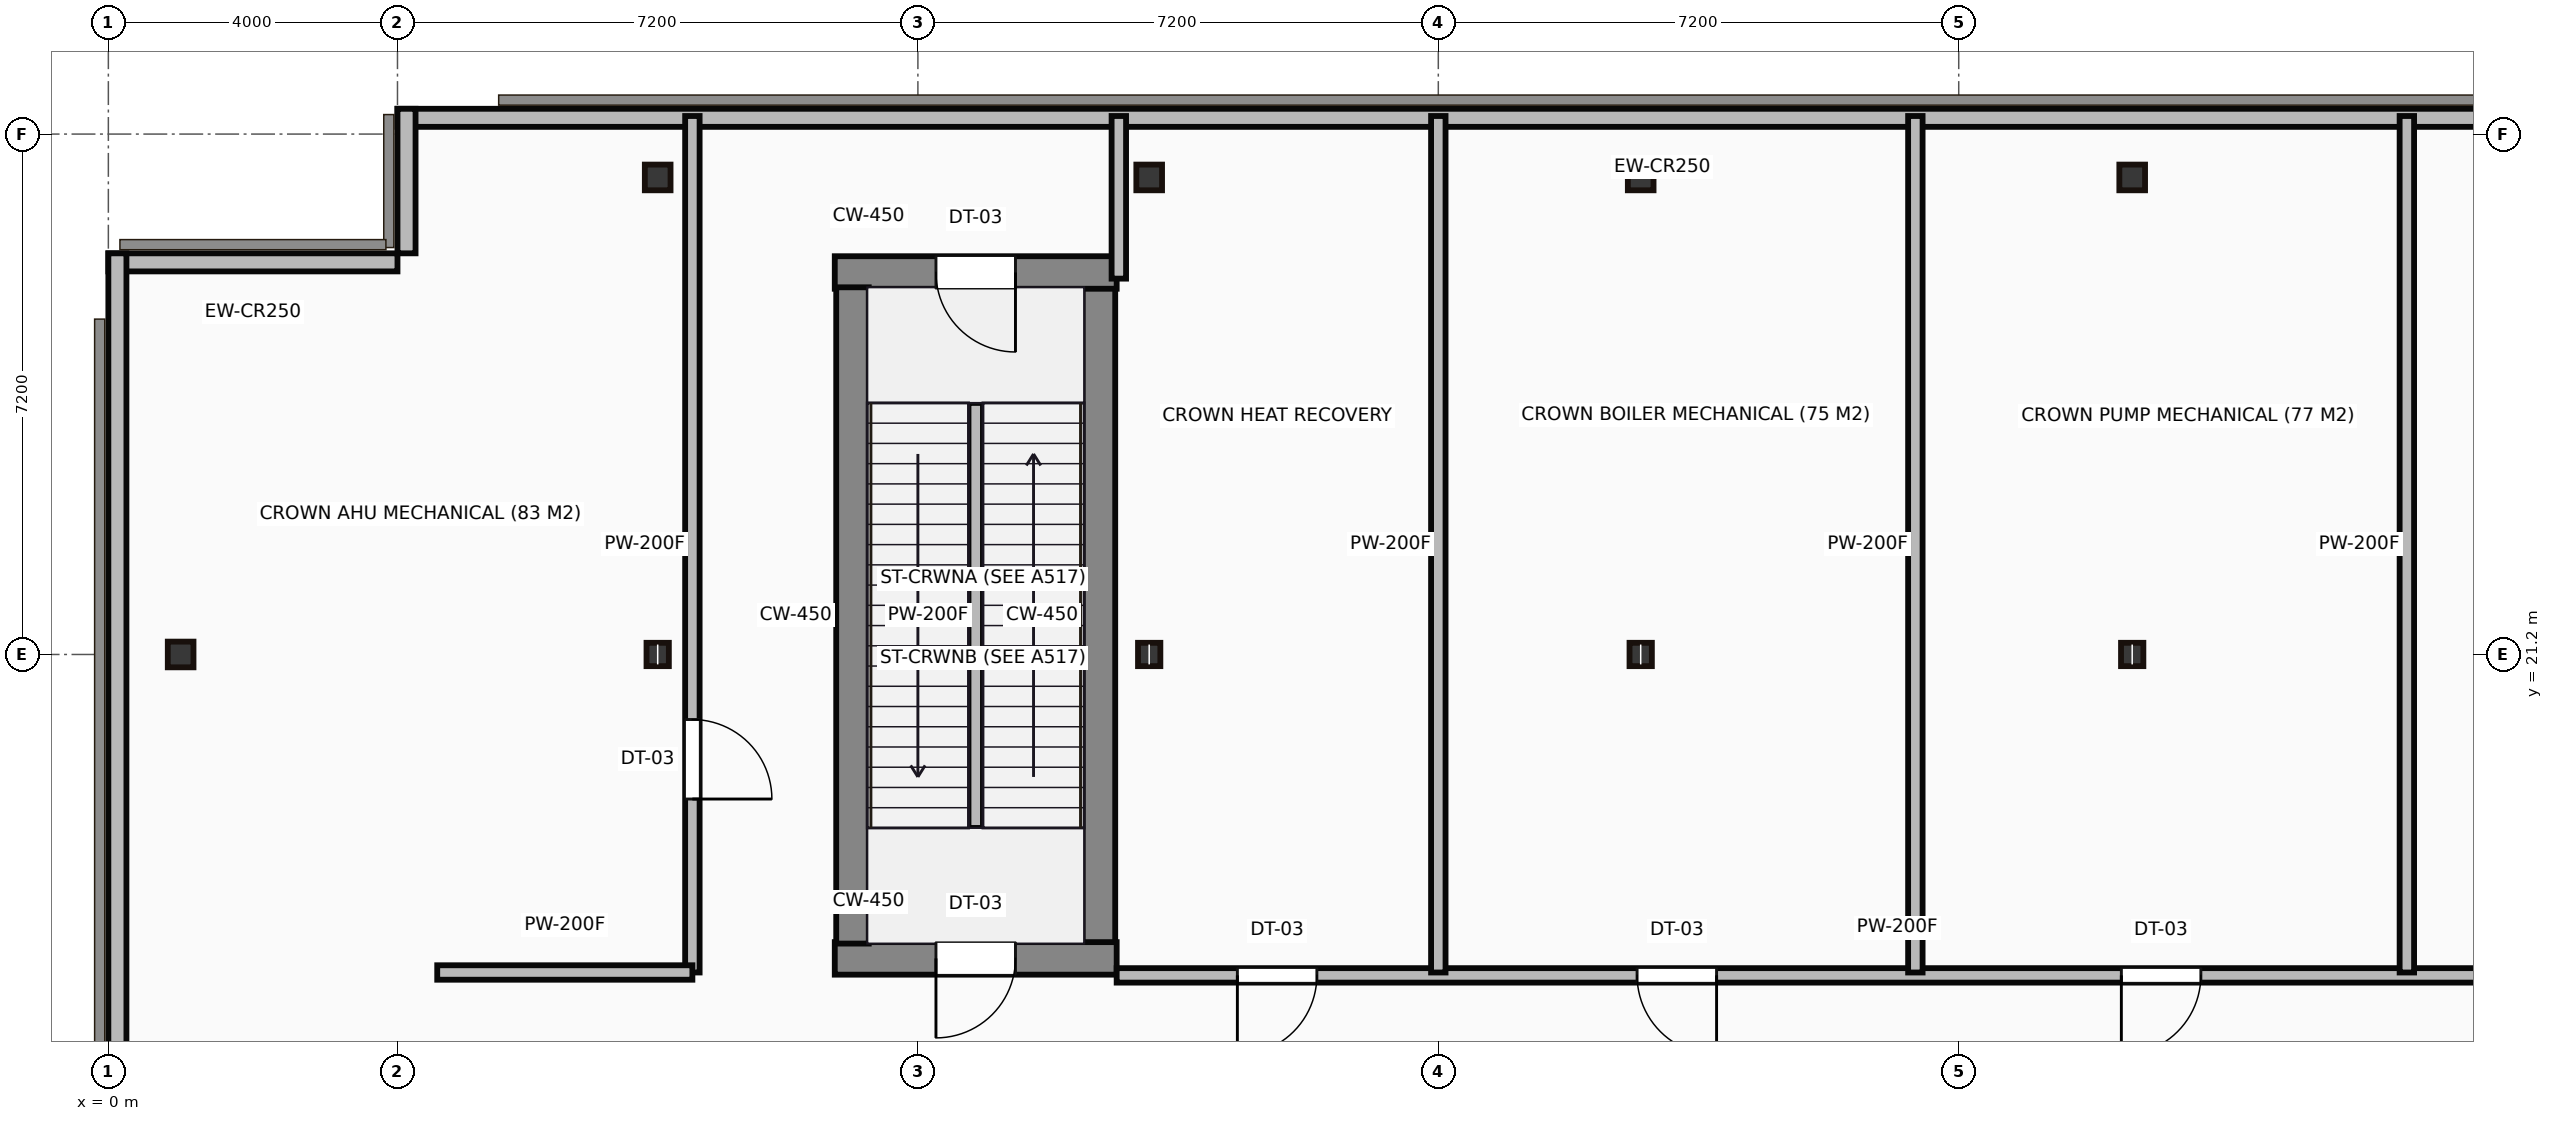
"""IFC4 building model, lengths in metres.
Left out: names, types, materials, properties, quantities, classifications, styles, units other than length and angle.
Written with IfcOpenShell. Run it as: python <this file> out.ifc"""

import sys

from ifc_helpers import new_model, si_unit, direction, frame, frame_2d, origin, origin_2d, place, context, subcontext, project, spatial, rectangle, hollow_rectangle, i_section, extrude, source, transform, mapped, element, fill, save


model = new_model("IFC4")
c1 = context("Model", 3, precision=1e-05, world=origin(), true_north=direction((0.0, 1.0)))
c2 = subcontext(c1, "Body", "Model", "MODEL_VIEW")
j1 = project(units=[si_unit("LENGTHUNIT", "METRE"), si_unit("PLANEANGLEUNIT", "RADIAN")], contexts=[c1])
p1 = place(None, origin())
s1 = spatial("IfcSite", under=j1, at=p1, CompositionType="ELEMENT")
p2 = place(p1, origin())
s2 = spatial("IfcBuilding", under=s1, at=p2, CompositionType="ELEMENT")
p3 = place(p2, frame((0.0, 0.0, 307.45)))
s3 = spatial("IfcBuildingStorey", under=s2, at=p3, CompositionType="ELEMENT", Elevation=307.45)
m1 = source(origin(), c2, "Body", "SweptSolid", [
    extrude(hollow_rectangle(XDim=0.356, YDim=0.356, WallThickness=0.019, at=origin_2d()), origin(), (0.0, 0.0, 1.0), 3.8),
])
p4 = place(p3, frame((1.0, 21.2, 0.0), z_axis=(0.0, 0.0, 1.0), x_axis=(1.0, 0.0, 0.0)))
e1 = element("IfcColumn", 1, at=p4, inside=s3, PredefinedType="COLUMN", context=c2, shape_type="MappedRepresentation", body=[
    mapped(m1, transform((0.0, 0.0, 0.0))),
])
m2 = source(origin(), c2, "Body", "SweptSolid", [
    extrude(i_section(OverallWidth=0.309, OverallDepth=0.323, WebThickness=0.014, FlangeThickness=0.023, at=origin_2d()), origin(), (0.0, 0.0, 1.0), 3.8),
])
p5 = place(p3, frame((7.6, 21.2, 0.0), z_axis=(0.0, 0.0, 1.0), x_axis=(1.0, 0.0, 0.0)))
e2 = element("IfcColumn", 2, at=p5, inside=s3, PredefinedType="COLUMN", context=c2, shape_type="MappedRepresentation", body=[
    mapped(m2, transform((0.0, 0.0, 0.0))),
])
p6 = place(p3, frame((7.6, 27.8, 0.0), z_axis=(0.0, 0.0, 1.0), x_axis=(1.0, 0.0, 0.0)))
e3 = element("IfcColumn", 3, at=p6, inside=s3, PredefinedType="COLUMN", context=c2, shape_type="MappedRepresentation", body=[
    mapped(m1, transform((0.0, 0.0, 0.0))),
])
p7 = place(p3, frame((14.4, 21.2, 0.0), z_axis=(0.0, 0.0, 1.0), x_axis=(1.0, 0.0, 0.0)))
e4 = element("IfcColumn", 4, at=p7, inside=s3, PredefinedType="COLUMN", context=c2, shape_type="MappedRepresentation", body=[
    mapped(m2, transform((0.0, 0.0, 0.0))),
])
p8 = place(p3, frame((14.4, 27.8, 0.0), z_axis=(0.0, 0.0, 1.0), x_axis=(1.0, 0.0, 0.0)))
e5 = element("IfcColumn", 5, at=p8, inside=s3, PredefinedType="COLUMN", context=c2, shape_type="MappedRepresentation", body=[
    mapped(m1, transform((0.0, 0.0, 0.0))),
])
p9 = place(p3, frame((21.2, 21.2, 0.0), z_axis=(0.0, 0.0, 1.0), x_axis=(1.0, 0.0, 0.0)))
e6 = element("IfcColumn", 6, at=p9, inside=s3, PredefinedType="COLUMN", context=c2, shape_type="MappedRepresentation", body=[
    mapped(m2, transform((0.0, 0.0, 0.0))),
])
p10 = place(p3, frame((21.2, 27.8, 0.0), z_axis=(0.0, 0.0, 1.0), x_axis=(1.0, 0.0, 0.0)))
e7 = element("IfcColumn", 7, at=p10, inside=s3, PredefinedType="COLUMN", context=c2, shape_type="MappedRepresentation", body=[
    mapped(m1, transform((0.0, 0.0, 0.0))),
])
p11 = place(p3, frame((28.0, 21.2, 0.0), z_axis=(0.0, 0.0, 1.0), x_axis=(1.0, 0.0, 0.0)))
e8 = element("IfcColumn", 8, at=p11, inside=s3, PredefinedType="COLUMN", context=c2, shape_type="MappedRepresentation", body=[
    mapped(m2, transform((0.0, 0.0, 0.0))),
])
p12 = place(p3, frame((28.0, 27.8, 0.0), z_axis=(0.0, 0.0, 1.0), x_axis=(1.0, 0.0, 0.0)))
e9 = element("IfcColumn", 9, at=p12, inside=s3, PredefinedType="COLUMN", context=c2, shape_type="MappedRepresentation", body=[
    mapped(m1, transform((0.0, 0.0, 0.0))),
])
m3 = source(origin(), c2, "Body", "SweptSolid", [
    extrude(rectangle(XDim=35.0, YDim=0.25, at=frame_2d((17.5, 0.0))), origin(), (0.0, 0.0, 1.0), 3.5),
])
p13 = place(p3, frame((39.0, 28.625, 0.0), z_axis=(0.0, 0.0, 1.0), x_axis=(-1.0, 0.0, 0.0)))
e10 = element("IfcWall", 10, at=p13, inside=s3, PredefinedType="STANDARD", context=c2, shape_type="MappedRepresentation", body=[
    mapped(m3, transform((0.0, 0.0, 0.0))),
])
m4 = source(origin(), c2, "Body", "SweptSolid", [
    extrude(rectangle(XDim=2.0, YDim=0.25, at=frame_2d((1.0, 0.0))), origin(), (0.0, 0.0, 1.0), 3.5),
])
p14 = place(p3, frame((4.125, 28.75, 0.0), z_axis=(0.0, 0.0, 1.0), x_axis=(0.0, -1.0, 0.0)))
e11 = element("IfcWall", 11, at=p14, inside=s3, PredefinedType="STANDARD", context=c2, shape_type="MappedRepresentation", body=[
    mapped(m4, transform((0.0, 0.0, 0.0))),
])
m5 = source(origin(), c2, "Body", "SweptSolid", [
    extrude(rectangle(XDim=4.0, YDim=0.25, at=frame_2d((2.0, 0.0))), origin(), (0.0, 0.0, 1.0), 3.5),
])
p15 = place(p3, frame((4.0, 26.625, 0.0), z_axis=(0.0, 0.0, 1.0), x_axis=(-1.0, 0.0, 0.0)))
e12 = element("IfcWall", 12, at=p15, inside=s3, PredefinedType="STANDARD", context=c2, shape_type="MappedRepresentation", body=[
    mapped(m5, transform((0.0, 0.0, 0.0))),
])
m6 = source(origin(), c2, "Body", "SweptSolid", [
    extrude(rectangle(XDim=22.75, YDim=0.25, at=frame_2d((11.375, 0.0))), origin(), (0.0, 0.0, 1.0), 3.5),
])
p16 = place(p3, frame((0.125, 26.75, 0.0), z_axis=(0.0, 0.0, 1.0), x_axis=(0.0, -1.0, 0.0)))
e13 = element("IfcWall", 13, at=p16, inside=s3, PredefinedType="STANDARD", context=c2, shape_type="MappedRepresentation", body=[
    mapped(m6, transform((0.0, 0.0, 0.0))),
])
m7 = source(origin(), c2, "Body", "SweptSolid", [
    extrude(rectangle(XDim=3.9, YDim=0.45, at=frame_2d((1.95, 0.0))), origin(), (0.0, 0.0, 1.0), 3.8),
])
p17 = place(p3, frame((10.05, 16.995, 0.0), z_axis=(0.0, 0.0, 1.0), x_axis=(1.0, 0.0, 0.0)))
e14 = element("IfcWall", 14, at=p17, inside=s3, PredefinedType="SHEAR", context=c2, shape_type="MappedRepresentation", body=[
    mapped(m7, transform((0.0, 0.0, 0.0))),
])
p18 = place(p17, frame((1.4, 0.0, 0.0)))
e15 = element("IfcOpeningElement", 15, at=p18, cuts=e14, PredefinedType="OPENING", context=c2, shape_type="SweptSolid", body=[
    extrude(rectangle(XDim=1.1, YDim=2.15, at=frame_2d((0.55, 1.075))), frame((0.0, 0.235, 0.0), z_axis=(0.0, -1.0, 0.0), x_axis=(1.0, 0.0, 0.0)), (0.0, 0.0, 1.0), 0.47),
])
m8 = source(origin(), c2, "Body", "SweptSolid", [
    extrude(rectangle(XDim=9.08, YDim=0.45, at=frame_2d((4.54, 0.0))), origin(), (0.0, 0.0, 1.0), 3.8),
])
for number, where, z_axis, x_axis in (
    (16, (10.295, 17.2, 0.0), (0.0, 0.0, 1.0), (0.0, 1.0, 0.0)),
    (17, (13.705, 17.2, 0.0), (0.0, 0.0, 1.0), (0.0, 1.0, 0.0)),
):
    element("IfcWall", number, at=place(p3, frame(where, z_axis=z_axis, x_axis=x_axis)), inside=s3, PredefinedType="SHEAR", context=c2, shape_type="MappedRepresentation", body=[
        mapped(m8, transform((0.0, 0.0, 0.0))),
    ])
p19 = place(p3, frame((10.05, 26.485, 0.0), z_axis=(0.0, 0.0, 1.0), x_axis=(1.0, 0.0, 0.0)))
e18 = element("IfcWall", 18, at=p19, inside=s3, PredefinedType="SHEAR", context=c2, shape_type="MappedRepresentation", body=[
    mapped(m7, transform((0.0, 0.0, 0.0))),
])
p20 = place(p19, frame((1.4, 0.0, 0.0)))
e19 = element("IfcOpeningElement", 19, at=p20, cuts=e18, PredefinedType="OPENING", context=c2, shape_type="SweptSolid", body=[
    extrude(rectangle(XDim=1.1, YDim=2.15, at=frame_2d((0.55, 1.075))), frame((0.0, 0.235, 0.0), z_axis=(0.0, -1.0, 0.0), x_axis=(1.0, 0.0, 0.0)), (0.0, 0.0, 1.0), 0.47),
])
m9 = source(origin(), c2, "Body", "SweptSolid", [
    extrude(rectangle(XDim=5.88, YDim=0.2, at=frame_2d((2.94, 0.0))), origin(), (0.0, 0.0, 1.0), 3.08),
])
p21 = place(p3, frame((12.0, 18.8, 0.0), z_axis=(0.0, 0.0, 1.0), x_axis=(0.0, 1.0, 0.0)))
e20 = element("IfcWall", 20, at=p21, inside=s3, PredefinedType="PARTITIONING", context=c2, shape_type="MappedRepresentation", body=[
    mapped(m9, transform((0.0, 0.0, 0.0))),
])
m10 = source(origin(), c2, "Body", "SweptSolid", [
    extrude(rectangle(XDim=11.85, YDim=0.2, at=frame_2d((5.925, 0.0))), origin(), (0.0, 0.0, 1.0), 3.5),
])
p22 = place(p3, frame((8.08, 16.8, 0.0), z_axis=(0.0, 0.0, 1.0), x_axis=(0.0, 1.0, 0.0)))
e21 = element("IfcWall", 21, at=p22, inside=s3, PredefinedType="PARTITIONING", context=c2, shape_type="MappedRepresentation", body=[
    mapped(m10, transform((0.0, 0.0, 0.0))),
])
p23 = place(p22, frame((2.4, 0.0, 0.0)))
e22 = element("IfcOpeningElement", 22, at=p23, cuts=e21, PredefinedType="OPENING", context=c2, shape_type="SweptSolid", body=[
    extrude(rectangle(XDim=1.1, YDim=2.15, at=frame_2d((0.55, 1.075))), frame((0.0, 0.11, 0.0), z_axis=(0.0, -1.0, 0.0), x_axis=(1.0, 0.0, 0.0)), (0.0, 0.0, 1.0), 0.22),
])
m11 = source(origin(), c2, "Body", "SweptSolid", [
    extrude(rectangle(XDim=3.53, YDim=0.2, at=frame_2d((1.765, 0.0))), origin(), (0.0, 0.0, 1.0), 3.5),
])
p24 = place(p3, frame((4.55, 16.8, 0.0), z_axis=(0.0, 0.0, 1.0), x_axis=(1.0, 0.0, 0.0)))
e23 = element("IfcWall", 23, at=p24, inside=s3, PredefinedType="PARTITIONING", context=c2, shape_type="MappedRepresentation", body=[
    mapped(m11, transform((0.0, 0.0, 0.0))),
])
m12 = source(origin(), c2, "Body", "SweptSolid", [
    extrude(rectangle(XDim=21.6, YDim=0.2, at=frame_2d((10.8, 0.0))), origin(), (0.0, 0.0, 1.0), 3.5),
])
p25 = place(p3, frame((13.95, 16.76, 0.0), z_axis=(0.0, 0.0, 1.0), x_axis=(1.0, 0.0, 0.0)))
e24 = element("IfcWall", 24, at=p25, inside=s3, PredefinedType="PARTITIONING", context=c2, shape_type="MappedRepresentation", body=[
    mapped(m12, transform((0.0, 0.0, 0.0))),
])
p26 = place(p25, frame((1.67, 0.0, 0.0)))
e25 = element("IfcOpeningElement", 25, at=p26, cuts=e24, PredefinedType="OPENING", context=c2, shape_type="SweptSolid", body=[
    extrude(rectangle(XDim=1.1, YDim=2.15, at=frame_2d((0.55, 1.075))), frame((0.0, 0.11, 0.0), z_axis=(0.0, -1.0, 0.0), x_axis=(1.0, 0.0, 0.0)), (0.0, 0.0, 1.0), 0.22),
])
p27 = place(p25, frame((7.2, 0.0, 0.0)))
e26 = element("IfcOpeningElement", 26, at=p27, cuts=e24, PredefinedType="OPENING", context=c2, shape_type="SweptSolid", body=[
    extrude(rectangle(XDim=1.1, YDim=2.15, at=frame_2d((0.55, 1.075))), frame((0.0, 0.11, 0.0), z_axis=(0.0, -1.0, 0.0), x_axis=(1.0, 0.0, 0.0)), (0.0, 0.0, 1.0), 0.22),
])
p28 = place(p25, frame((13.9, 0.0, 0.0)))
e27 = element("IfcOpeningElement", 27, at=p28, cuts=e24, PredefinedType="OPENING", context=c2, shape_type="SweptSolid", body=[
    extrude(rectangle(XDim=1.1, YDim=2.15, at=frame_2d((0.55, 1.075))), frame((0.0, 0.11, 0.0), z_axis=(0.0, -1.0, 0.0), x_axis=(1.0, 0.0, 0.0)), (0.0, 0.0, 1.0), 0.22),
])
p29 = place(p25, frame((19.14, 0.0, 0.0)))
e28 = element("IfcOpeningElement", 28, at=p29, cuts=e24, PredefinedType="OPENING", context=c2, shape_type="SweptSolid", body=[
    extrude(rectangle(XDim=1.1, YDim=2.15, at=frame_2d((0.55, 1.075))), frame((0.0, 0.11, 0.0), z_axis=(0.0, -1.0, 0.0), x_axis=(1.0, 0.0, 0.0)), (0.0, 0.0, 1.0), 0.22),
])
m13 = source(origin(), c2, "Body", "SweptSolid", [
    extrude(rectangle(XDim=2.25, YDim=0.2, at=frame_2d((1.125, 0.0))), origin(), (0.0, 0.0, 1.0), 3.5),
])
p30 = place(p3, frame((13.98, 26.4, 0.0), z_axis=(0.0, 0.0, 1.0), x_axis=(0.0, 1.0, 0.0)))
e29 = element("IfcWall", 29, at=p30, inside=s3, PredefinedType="PARTITIONING", context=c2, shape_type="MappedRepresentation", body=[
    mapped(m13, transform((0.0, 0.0, 0.0))),
])
for number, where, z_axis, x_axis in (
    (30, (18.4, 16.8, 0.0), (0.0, 0.0, 1.0), (0.0, 1.0, 0.0)),
    (31, (25.0, 16.8, 0.0), (0.0, 0.0, 1.0), (0.0, 1.0, 0.0)),
    (32, (31.8, 16.8, 0.0), (0.0, 0.0, 1.0), (0.0, 1.0, 0.0)),
):
    element("IfcWall", number, at=place(p3, frame(where, z_axis=z_axis, x_axis=x_axis)), inside=s3, PredefinedType="PARTITIONING", context=c2, shape_type="MappedRepresentation", body=[
        mapped(m10, transform((0.0, 0.0, 0.0))),
    ])
m14 = source(origin(), c2, "Body", "SweptSolid", [
    extrude(rectangle(XDim=1.1, YDim=2.15, at=frame_2d((0.55, 1.075))), frame((0.0, 0.025, 0.0), z_axis=(0.0, -1.0, 0.0), x_axis=(1.0, 0.0, 0.0)), (0.0, 0.0, 1.0), 0.05),
])
p31 = place(p23, frame((1.1, 0.0, 0.0), z_axis=(0.0, 0.0, 1.0), x_axis=(-1.0, 0.0, 0.0)))
e33 = element("IfcDoor", 33, at=p31, inside=s3, OperationType="SINGLE_SWING_LEFT", PredefinedType="DOOR", context=c2, shape_type="MappedRepresentation", body=[
    mapped(m14, transform((0.0, 0.0, 0.0))),
])
fill(e22, e33)
p32 = place(p26, origin())
e34 = element("IfcDoor", 34, at=p32, inside=s3, OperationType="SINGLE_SWING_LEFT", PredefinedType="DOOR", context=c2, shape_type="MappedRepresentation", body=[
    mapped(m14, transform((0.0, 0.0, 0.0))),
])
fill(e25, e34)
p33 = place(p27, origin())
e35 = element("IfcDoor", 35, at=p33, inside=s3, OperationType="SINGLE_SWING_RIGHT", PredefinedType="DOOR", context=c2, shape_type="MappedRepresentation", body=[
    mapped(m14, transform((0.0, 0.0, 0.0))),
])
fill(e26, e35)
p34 = place(p28, origin())
e36 = element("IfcDoor", 36, at=p34, inside=s3, OperationType="SINGLE_SWING_LEFT", PredefinedType="DOOR", context=c2, shape_type="MappedRepresentation", body=[
    mapped(m14, transform((0.0, 0.0, 0.0))),
])
fill(e27, e36)
p35 = place(p18, origin())
e37 = element("IfcDoor", 37, at=p35, inside=s3, OperationType="SINGLE_SWING_LEFT", PredefinedType="DOOR", context=c2, shape_type="MappedRepresentation", body=[
    mapped(m14, transform((0.0, 0.0, 0.0))),
])
fill(e15, e37)
p36 = place(p20, frame((1.1, 0.0, 0.0), z_axis=(0.0, 0.0, 1.0), x_axis=(-1.0, 0.0, 0.0)))
e38 = element("IfcDoor", 38, at=p36, inside=s3, OperationType="SINGLE_SWING_RIGHT", PredefinedType="DOOR", context=c2, shape_type="MappedRepresentation", body=[
    mapped(m14, transform((0.0, 0.0, 0.0))),
])
fill(e19, e38)
save(model, sys.argv[1])
